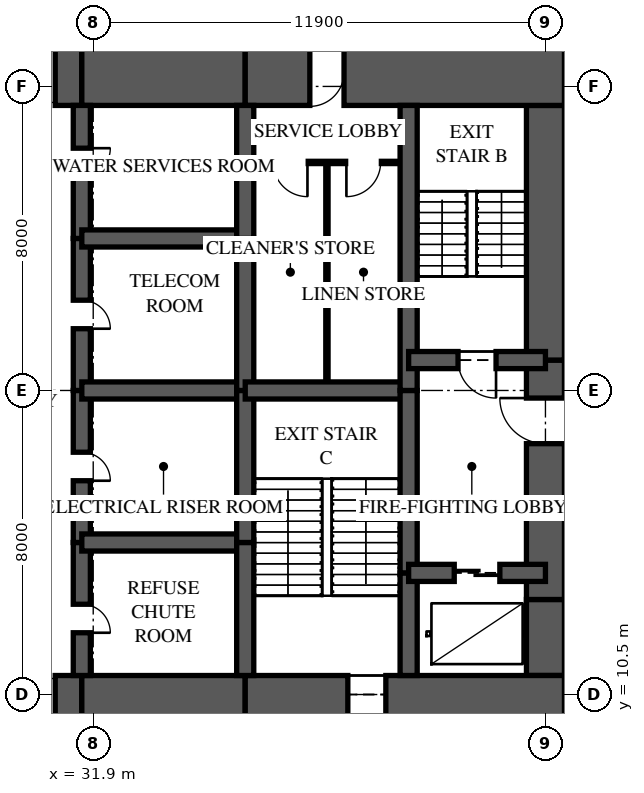
"""IFC4 building model, lengths in metres.
Left out: names, types, materials, properties, quantities, classifications, styles, units other than length and angle.
Written with IfcOpenShell. Run it as: python <this file> out.ifc"""

import sys

from ifc_helpers import new_model, si_unit, direction, frame, frame_2d, origin, place, context, subcontext, project, spatial, rectangle, extrude, element, fill, save


model = new_model("IFC4")
c1 = context("Model", 3, precision=1e-05, world=origin(), true_north=direction((0.0, 1.0)))
c2 = subcontext(c1, "Body", "Model", "MODEL_VIEW")
j1 = project(units=[si_unit("LENGTHUNIT", "METRE"), si_unit("PLANEANGLEUNIT", "RADIAN")], contexts=[c1])
p1 = place(None, origin())
s1 = spatial("IfcSite", under=j1, at=p1, CompositionType="ELEMENT")
p2 = place(p1, origin())
s2 = spatial("IfcBuilding", under=s1, at=p2, CompositionType="ELEMENT")
p3 = place(p2, origin())
s3 = spatial("IfcBuildingStorey", under=s2, at=p3, CompositionType="ELEMENT", Elevation=0.0)
p4 = place(p3, frame((26.0, 10.125, 0.0), z_axis=(0.0, 0.0, 1.0), x_axis=(1.0, 0.0, 0.0)))
e1 = element("IfcWall", 1, at=p4, inside=s3, PredefinedType="SHEAR", context=c2, shape_type="SweptSolid", body=[
    extrude(rectangle(XDim=5.6, YDim=1.75, at=frame_2d((2.8, 0.0))), origin(), (0.0, 0.0, 1.0), 6.0),
])
p5 = place(p4, frame((3.3, 0.0, 0.0)))
e2 = element("IfcOpeningElement", 2, at=p5, cuts=e1, PredefinedType="OPENING", context=c2, shape_type="SweptSolid", body=[
    extrude(rectangle(XDim=1.6, YDim=2.1, at=frame_2d((0.8, 1.05))), frame((0.0, 0.885, 0.0), z_axis=(0.0, -1.0, 0.0), x_axis=(1.0, 0.0, 0.0)), (0.0, 0.0, 1.0), 1.77),
])
p6 = place(p3, frame((31.6, 10.125, 0.0), z_axis=(0.0, 0.0, 1.0), x_axis=(1.0, 0.0, 0.0)))
e3 = element("IfcWall", 3, at=p6, inside=s3, PredefinedType="SHEAR", context=c2, shape_type="SweptSolid", body=[
    extrude(rectangle(XDim=4.3, YDim=1.75, at=frame_2d((2.15, 0.0))), origin(), (0.0, 0.0, 1.0), 6.0),
])
p7 = place(p3, frame((35.9, 10.125, 0.0), z_axis=(0.0, 0.0, 1.0), x_axis=(1.0, 0.0, 0.0)))
e4 = element("IfcWall", 4, at=p7, inside=s3, PredefinedType="SHEAR", context=c2, shape_type="SweptSolid", body=[
    extrude(rectangle(XDim=8.4, YDim=1.75, at=frame_2d((4.2, 0.0))), origin(), (0.0, 0.0, 1.0), 6.0),
])
p8 = place(p7, frame((2.7, 0.0, 0.0)))
e5 = element("IfcOpeningElement", 5, at=p8, cuts=e4, PredefinedType="OPENING", context=c2, shape_type="SweptSolid", body=[
    extrude(rectangle(XDim=1.0, YDim=2.1, at=frame_2d((0.5, 1.05))), frame((0.0, 0.885, 0.0), z_axis=(0.0, -1.0, 0.0), x_axis=(1.0, 0.0, 0.0)), (0.0, 0.0, 1.0), 1.77),
])
p9 = place(p3, frame((44.3, 26.875, 0.0), z_axis=(0.0, 0.0, 1.0), x_axis=(-1.0, 0.0, 0.0)))
e6 = element("IfcWall", 6, at=p9, inside=s3, PredefinedType="SHEAR", context=c2, shape_type="SweptSolid", body=[
    extrude(rectangle(XDim=8.4, YDim=1.75, at=frame_2d((4.2, 0.0))), origin(), (0.0, 0.0, 1.0), 6.0),
])
p10 = place(p9, frame((5.8, 0.0, 0.0)))
e7 = element("IfcOpeningElement", 7, at=p10, cuts=e6, PredefinedType="OPENING", context=c2, shape_type="SweptSolid", body=[
    extrude(rectangle(XDim=0.9, YDim=2.1, at=frame_2d((0.45, 1.05))), frame((0.0, 0.885, 0.0), z_axis=(0.0, -1.0, 0.0), x_axis=(1.0, 0.0, 0.0)), (0.0, 0.0, 1.0), 1.77),
])
p11 = place(p3, frame((35.9, 26.875, 0.0), z_axis=(0.0, 0.0, 1.0), x_axis=(-1.0, 0.0, 0.0)))
e8 = element("IfcWall", 8, at=p11, inside=s3, PredefinedType="SHEAR", context=c2, shape_type="SweptSolid", body=[
    extrude(rectangle(XDim=4.3, YDim=1.75, at=frame_2d((2.15, 0.0))), origin(), (0.0, 0.0, 1.0), 6.0),
])
p12 = place(p3, frame((31.6, 26.875, 0.0), z_axis=(0.0, 0.0, 1.0), x_axis=(-1.0, 0.0, 0.0)))
e9 = element("IfcWall", 9, at=p12, inside=s3, PredefinedType="SHEAR", context=c2, shape_type="SweptSolid", body=[
    extrude(rectangle(XDim=5.6, YDim=1.75, at=frame_2d((2.8, 0.0))), origin(), (0.0, 0.0, 1.0), 6.0),
])
p13 = place(p12, frame((0.7, 0.0, 0.0)))
e10 = element("IfcOpeningElement", 10, at=p13, cuts=e9, PredefinedType="OPENING", context=c2, shape_type="SweptSolid", body=[
    extrude(rectangle(XDim=1.6, YDim=2.1, at=frame_2d((0.8, 1.05))), frame((0.0, 0.885, 0.0), z_axis=(0.0, -1.0, 0.0), x_axis=(1.0, 0.0, 0.0)), (0.0, 0.0, 1.0), 1.77),
])
p14 = place(p3, frame((43.8, 11.0, 0.0), z_axis=(0.0, 0.0, 1.0), x_axis=(0.0, 1.0, 0.0)))
e11 = element("IfcWall", 11, at=p14, inside=s3, PredefinedType="SHEAR", context=c2, shape_type="SweptSolid", body=[
    extrude(rectangle(XDim=2.0, YDim=1.0, at=frame_2d((1.0, 0.0))), origin(), (0.0, 0.0, 1.0), 6.0),
])
p15 = place(p3, frame((43.8, 13.0, 0.0), z_axis=(0.0, 0.0, 1.0), x_axis=(0.0, 1.0, 0.0)))
e12 = element("IfcWall", 12, at=p15, inside=s3, PredefinedType="SHEAR", context=c2, shape_type="SweptSolid", body=[
    extrude(rectangle(XDim=6.3, YDim=1.0, at=frame_2d((3.15, 0.0))), origin(), (0.0, 0.0, 1.0), 6.0),
])
p16 = place(p15, frame((4.1, 0.0, 0.0)))
e13 = element("IfcOpeningElement", 13, at=p16, cuts=e12, PredefinedType="OPENING", context=c2, shape_type="SweptSolid", body=[
    extrude(rectangle(XDim=1.2, YDim=2.2, at=frame_2d((0.6, 1.1))), frame((0.0, 0.51, 0.0), z_axis=(0.0, -1.0, 0.0), x_axis=(1.0, 0.0, 0.0)), (0.0, 0.0, 1.0), 1.02),
])
p17 = place(p3, frame((43.8, 19.3, 0.0), z_axis=(0.0, 0.0, 1.0), x_axis=(0.0, 1.0, 0.0)))
e14 = element("IfcWall", 14, at=p17, inside=s3, PredefinedType="SHEAR", context=c2, shape_type="SweptSolid", body=[
    extrude(rectangle(XDim=6.7, YDim=1.0, at=frame_2d((3.35, 0.0))), origin(), (0.0, 0.0, 1.0), 6.0),
])
p18 = place(p3, frame((31.6, 11.0, 0.0), z_axis=(0.0, 0.0, 1.0), x_axis=(0.0, 1.0, 0.0)))
e15 = element("IfcWall", 15, at=p18, inside=s3, PredefinedType="SHEAR", context=c2, shape_type="SweptSolid", body=[
    extrude(rectangle(XDim=3.5, YDim=0.45, at=frame_2d((1.75, 0.0))), origin(), (0.0, 0.0, 1.0), 6.0),
])
p19 = place(p18, frame((1.125, 0.0, 0.0)))
e16 = element("IfcOpeningElement", 16, at=p19, cuts=e15, PredefinedType="OPENING", context=c2, shape_type="SweptSolid", body=[
    extrude(rectangle(XDim=0.75, YDim=2.1, at=frame_2d((0.375, 1.05))), frame((0.0, 0.235, 0.0), z_axis=(0.0, -1.0, 0.0), x_axis=(1.0, 0.0, 0.0)), (0.0, 0.0, 1.0), 0.47),
])
p20 = place(p3, frame((31.6, 14.5, 0.0), z_axis=(0.0, 0.0, 1.0), x_axis=(0.0, 1.0, 0.0)))
e17 = element("IfcWall", 17, at=p20, inside=s3, PredefinedType="SHEAR", context=c2, shape_type="SweptSolid", body=[
    extrude(rectangle(XDim=4.0, YDim=0.45, at=frame_2d((2.0, 0.0))), origin(), (0.0, 0.0, 1.0), 6.0),
])
p21 = place(p20, frame((1.625, 0.0, 0.0)))
e18 = element("IfcOpeningElement", 18, at=p21, cuts=e17, PredefinedType="OPENING", context=c2, shape_type="SweptSolid", body=[
    extrude(rectangle(XDim=0.75, YDim=2.1, at=frame_2d((0.375, 1.05))), frame((0.0, 0.235, 0.0), z_axis=(0.0, -1.0, 0.0), x_axis=(1.0, 0.0, 0.0)), (0.0, 0.0, 1.0), 0.47),
])
p22 = place(p3, frame((31.6, 18.5, 0.0), z_axis=(0.0, 0.0, 1.0), x_axis=(0.0, 1.0, 0.0)))
e19 = element("IfcWall", 19, at=p22, inside=s3, PredefinedType="SHEAR", context=c2, shape_type="SweptSolid", body=[
    extrude(rectangle(XDim=4.0, YDim=0.45, at=frame_2d((2.0, 0.0))), origin(), (0.0, 0.0, 1.0), 6.0),
])
p23 = place(p22, frame((1.625, 0.0, 0.0)))
e20 = element("IfcOpeningElement", 20, at=p23, cuts=e19, PredefinedType="OPENING", context=c2, shape_type="SweptSolid", body=[
    extrude(rectangle(XDim=0.75, YDim=2.1, at=frame_2d((0.375, 1.05))), frame((0.0, 0.235, 0.0), z_axis=(0.0, -1.0, 0.0), x_axis=(1.0, 0.0, 0.0)), (0.0, 0.0, 1.0), 0.47),
])
p24 = place(p3, frame((31.6, 22.5, 0.0), z_axis=(0.0, 0.0, 1.0), x_axis=(0.0, 1.0, 0.0)))
e21 = element("IfcWall", 21, at=p24, inside=s3, PredefinedType="SHEAR", context=c2, shape_type="SweptSolid", body=[
    extrude(rectangle(XDim=3.5, YDim=0.45, at=frame_2d((1.75, 0.0))), origin(), (0.0, 0.0, 1.0), 6.0),
])
p25 = place(p24, frame((1.625, 0.0, 0.0)))
e22 = element("IfcOpeningElement", 22, at=p25, cuts=e21, PredefinedType="OPENING", context=c2, shape_type="SweptSolid", body=[
    extrude(rectangle(XDim=0.75, YDim=2.1, at=frame_2d((0.375, 1.05))), frame((0.0, 0.235, 0.0), z_axis=(0.0, -1.0, 0.0), x_axis=(1.0, 0.0, 0.0)), (0.0, 0.0, 1.0), 0.47),
])
p26 = place(p3, frame((35.9, 11.0, 0.0), z_axis=(0.0, 0.0, 1.0), x_axis=(0.0, 1.0, 0.0)))
e23 = element("IfcWall", 23, at=p26, inside=s3, PredefinedType="SHEAR", context=c2, shape_type="SweptSolid", body=[
    extrude(rectangle(XDim=3.5, YDim=0.45, at=frame_2d((1.75, 0.0))), origin(), (0.0, 0.0, 1.0), 6.0),
])
for number, where, z_axis, x_axis in (
    (24, (35.9, 14.5, 0.0), (0.0, 0.0, 1.0), (0.0, 1.0, 0.0)),
    (25, (35.9, 18.5, 0.0), (0.0, 0.0, 1.0), (0.0, 1.0, 0.0)),
):
    element("IfcWall", number, at=place(p3, frame(where, z_axis=z_axis, x_axis=x_axis)), inside=s3, PredefinedType="SHEAR", context=c2, shape_type="SweptSolid", body=[
        extrude(rectangle(XDim=4.0, YDim=0.45, at=frame_2d((2.0, 0.0))), origin(), (0.0, 0.0, 1.0), 6.0),
    ])
p27 = place(p3, frame((35.9, 22.5, 0.0), z_axis=(0.0, 0.0, 1.0), x_axis=(0.0, 1.0, 0.0)))
e26 = element("IfcWall", 26, at=p27, inside=s3, PredefinedType="SHEAR", context=c2, shape_type="SweptSolid", body=[
    extrude(rectangle(XDim=3.5, YDim=0.45, at=frame_2d((1.75, 0.0))), origin(), (0.0, 0.0, 1.0), 6.0),
])
p28 = place(p3, frame((40.2, 11.0, 0.0), z_axis=(0.0, 0.0, 1.0), x_axis=(0.0, 1.0, 0.0)))
e27 = element("IfcWall", 27, at=p28, inside=s3, PredefinedType="SHEAR", context=c2, shape_type="SweptSolid", body=[
    extrude(rectangle(XDim=2.7, YDim=0.45, at=frame_2d((1.35, 0.0))), origin(), (0.0, 0.0, 1.0), 6.0),
])
p29 = place(p3, frame((40.2, 13.7, 0.0), z_axis=(0.0, 0.0, 1.0), x_axis=(0.0, 1.0, 0.0)))
e28 = element("IfcWall", 28, at=p29, inside=s3, PredefinedType="SHEAR", context=c2, shape_type="SweptSolid", body=[
    extrude(rectangle(XDim=4.8, YDim=0.45, at=frame_2d((2.4, 0.0))), origin(), (0.0, 0.0, 1.0), 6.0),
])
p30 = place(p3, frame((40.2, 18.5, 0.0), z_axis=(0.0, 0.0, 1.0), x_axis=(0.0, 1.0, 0.0)))
e29 = element("IfcWall", 29, at=p30, inside=s3, PredefinedType="SHEAR", context=c2, shape_type="SweptSolid", body=[
    extrude(rectangle(XDim=7.5, YDim=0.45, at=frame_2d((3.75, 0.0))), origin(), (0.0, 0.0, 1.0), 6.0),
])
for number, where, z_axis, x_axis in (
    (30, (31.6, 14.5, 0.0), (0.0, 0.0, 1.0), (1.0, 0.0, 0.0)),
    (31, (31.6, 18.5, 0.0), (0.0, 0.0, 1.0), (1.0, 0.0, 0.0)),
    (32, (31.6, 22.5, 0.0), (0.0, 0.0, 1.0), (1.0, 0.0, 0.0)),
):
    element("IfcWall", number, at=place(p3, frame(where, z_axis=z_axis, x_axis=x_axis)), inside=s3, PredefinedType="SHEAR", context=c2, shape_type="SweptSolid", body=[
        extrude(rectangle(XDim=4.3, YDim=0.45, at=frame_2d((2.15, 0.0))), origin(), (0.0, 0.0, 1.0), 6.0),
    ])
p31 = place(p3, frame((35.9, 18.5, 0.0), z_axis=(0.0, 0.0, 1.0), x_axis=(1.0, 0.0, 0.0)))
e33 = element("IfcWall", 33, at=p31, inside=s3, PredefinedType="SHEAR", context=c2, shape_type="SweptSolid", body=[
    extrude(rectangle(XDim=4.3, YDim=0.45, at=frame_2d((2.15, 0.0))), origin(), (0.0, 0.0, 1.0), 6.0),
])
p32 = place(p3, frame((40.2, 13.7, 0.0), z_axis=(0.0, 0.0, 1.0), x_axis=(1.0, 0.0, 0.0)))
e34 = element("IfcWall", 34, at=p32, inside=s3, PredefinedType="SHEAR", context=c2, shape_type="SweptSolid", body=[
    extrude(rectangle(XDim=3.6, YDim=0.45, at=frame_2d((1.8, 0.0))), origin(), (0.0, 0.0, 1.0), 6.0),
])
p33 = place(p32, frame((1.2, 0.0, 0.0)))
e35 = element("IfcOpeningElement", 35, at=p33, cuts=e34, PredefinedType="OPENING", context=c2, shape_type="SweptSolid", body=[
    extrude(rectangle(XDim=1.2, YDim=2.1, at=frame_2d((0.6, 1.05))), frame((0.0, 0.235, 0.0), z_axis=(0.0, -1.0, 0.0), x_axis=(1.0, 0.0, 0.0)), (0.0, 0.0, 1.0), 0.47),
])
p34 = place(p3, frame((40.2, 19.3, 0.0), z_axis=(0.0, 0.0, 1.0), x_axis=(1.0, 0.0, 0.0)))
e36 = element("IfcWall", 36, at=p34, inside=s3, PredefinedType="SHEAR", context=c2, shape_type="SweptSolid", body=[
    extrude(rectangle(XDim=3.6, YDim=0.45, at=frame_2d((1.8, 0.0))), origin(), (0.0, 0.0, 1.0), 6.0),
])
p35 = place(p34, frame((1.3, 0.0, 0.0)))
e37 = element("IfcOpeningElement", 37, at=p35, cuts=e36, PredefinedType="OPENING", context=c2, shape_type="SweptSolid", body=[
    extrude(rectangle(XDim=1.0, YDim=2.1, at=frame_2d((0.5, 1.05))), frame((0.0, 0.235, 0.0), z_axis=(0.0, -1.0, 0.0), x_axis=(1.0, 0.0, 0.0)), (0.0, 0.0, 1.0), 0.47),
])
p36 = place(p3, frame((36.125, 24.5, 0.0), z_axis=(0.0, 0.0, 1.0), x_axis=(1.0, 0.0, 0.0)))
e38 = element("IfcWall", 38, at=p36, inside=s3, PredefinedType="PARTITIONING", context=c2, shape_type="SweptSolid", body=[
    extrude(rectangle(XDim=3.85, YDim=0.1, at=frame_2d((1.925, 0.0))), origin(), (0.0, 0.0, 1.0), 5.72),
])
p37 = place(p36, frame((0.512, 0.0, 0.0)))
e39 = element("IfcOpeningElement", 39, at=p37, cuts=e38, PredefinedType="OPENING", context=c2, shape_type="SweptSolid", body=[
    extrude(rectangle(XDim=0.9, YDim=2.1, at=frame_2d((0.45, 1.05))), frame((0.0, 0.06, 0.0), z_axis=(0.0, -1.0, 0.0), x_axis=(1.0, 0.0, 0.0)), (0.0, 0.0, 1.0), 0.12),
])
p38 = place(p36, frame((2.438, 0.0, 0.0)))
e40 = element("IfcOpeningElement", 40, at=p38, cuts=e38, PredefinedType="OPENING", context=c2, shape_type="SweptSolid", body=[
    extrude(rectangle(XDim=0.9, YDim=2.1, at=frame_2d((0.45, 1.05))), frame((0.0, 0.06, 0.0), z_axis=(0.0, -1.0, 0.0), x_axis=(1.0, 0.0, 0.0)), (0.0, 0.0, 1.0), 0.12),
])
p39 = place(p3, frame((38.05, 18.725, 0.0), z_axis=(0.0, 0.0, 1.0), x_axis=(0.0, 1.0, 0.0)))
e41 = element("IfcWall", 41, at=p39, inside=s3, PredefinedType="PARTITIONING", context=c2, shape_type="SweptSolid", body=[
    extrude(rectangle(XDim=5.725, YDim=0.1, at=frame_2d((2.862, 0.0))), origin(), (0.0, 0.0, 1.0), 5.72),
])
p40 = place(p37, frame((0.9, 0.0, 0.0), z_axis=(0.0, 0.0, 1.0), x_axis=(-1.0, 0.0, 0.0)))
e42 = element("IfcDoor", 42, at=p40, inside=s3, OperationType="SINGLE_SWING_LEFT", PredefinedType="DOOR", context=c2, shape_type="SweptSolid", body=[
    extrude(rectangle(XDim=0.9, YDim=2.1, at=frame_2d((0.45, 1.05))), frame((0.0, 0.025, 0.0), z_axis=(0.0, -1.0, 0.0), x_axis=(1.0, 0.0, 0.0)), (0.0, 0.0, 1.0), 0.05),
])
fill(e39, e42)
p41 = place(p38, frame((0.9, 0.0, 0.0), z_axis=(0.0, 0.0, 1.0), x_axis=(-1.0, 0.0, 0.0)))
e43 = element("IfcDoor", 43, at=p41, inside=s3, OperationType="SINGLE_SWING_RIGHT", PredefinedType="DOOR", context=c2, shape_type="SweptSolid", body=[
    extrude(rectangle(XDim=0.9, YDim=2.1, at=frame_2d((0.45, 1.05))), frame((0.0, 0.025, 0.0), z_axis=(0.0, -1.0, 0.0), x_axis=(1.0, 0.0, 0.0)), (0.0, 0.0, 1.0), 0.05),
])
fill(e40, e43)
p42 = place(p35, frame((1.0, 0.0, 0.0), z_axis=(0.0, 0.0, 1.0), x_axis=(-1.0, 0.0, 0.0)))
e44 = element("IfcDoor", 44, at=p42, inside=s3, OperationType="SINGLE_SWING_LEFT", PredefinedType="DOOR", context=c2, shape_type="SweptSolid", body=[
    extrude(rectangle(XDim=1.0, YDim=2.1, at=frame_2d((0.5, 1.05))), frame((0.0, 0.025, 0.0), z_axis=(0.0, -1.0, 0.0), x_axis=(1.0, 0.0, 0.0)), (0.0, 0.0, 1.0), 0.05),
])
fill(e37, e44)
p43 = place(p16, origin())
e45 = element("IfcDoor", 45, at=p43, inside=s3, OperationType="SINGLE_SWING_RIGHT", PredefinedType="DOOR", context=c2, shape_type="SweptSolid", body=[
    extrude(rectangle(XDim=1.2, YDim=2.2, at=frame_2d((0.6, 1.1))), frame((0.0, 0.025, 0.0), z_axis=(0.0, -1.0, 0.0), x_axis=(1.0, 0.0, 0.0)), (0.0, 0.0, 1.0), 0.05),
])
fill(e13, e45)
p44 = place(p33, origin())
e46 = element("IfcDoor", 46, at=p44, inside=s3, OperationType="SLIDING_TO_LEFT", PredefinedType="DOOR", context=c2, shape_type="SweptSolid", body=[
    extrude(rectangle(XDim=1.2, YDim=2.1, at=frame_2d((0.6, 1.05))), frame((0.0, 0.025, 0.0), z_axis=(0.0, -1.0, 0.0), x_axis=(1.0, 0.0, 0.0)), (0.0, 0.0, 1.0), 0.05),
])
fill(e35, e46)
p45 = place(p5, origin())
e47 = element("IfcDoor", 47, at=p45, inside=s3, OperationType="DOUBLE_DOOR_SINGLE_SWING", PredefinedType="DOOR", context=c2, shape_type="SweptSolid", body=[
    extrude(rectangle(XDim=1.6, YDim=2.1, at=frame_2d((0.8, 1.05))), frame((0.0, 0.025, 0.0), z_axis=(0.0, -1.0, 0.0), x_axis=(1.0, 0.0, 0.0)), (0.0, 0.0, 1.0), 0.05),
])
fill(e2, e47)
p46 = place(p13, origin())
e48 = element("IfcDoor", 48, at=p46, inside=s3, OperationType="DOUBLE_DOOR_SINGLE_SWING", PredefinedType="DOOR", context=c2, shape_type="SweptSolid", body=[
    extrude(rectangle(XDim=1.6, YDim=2.1, at=frame_2d((0.8, 1.05))), frame((0.0, 0.025, 0.0), z_axis=(0.0, -1.0, 0.0), x_axis=(1.0, 0.0, 0.0)), (0.0, 0.0, 1.0), 0.05),
])
fill(e10, e48)
p47 = place(p19, frame((0.75, 0.0, 0.0), z_axis=(0.0, 0.0, 1.0), x_axis=(-1.0, 0.0, 0.0)))
e49 = element("IfcDoor", 49, at=p47, inside=s3, OperationType="SINGLE_SWING_RIGHT", PredefinedType="DOOR", context=c2, shape_type="SweptSolid", body=[
    extrude(rectangle(XDim=0.75, YDim=2.1, at=frame_2d((0.375, 1.05))), frame((0.0, 0.025, 0.0), z_axis=(0.0, -1.0, 0.0), x_axis=(1.0, 0.0, 0.0)), (0.0, 0.0, 1.0), 0.05),
])
fill(e16, e49)
p48 = place(p21, frame((0.75, 0.0, 0.0), z_axis=(0.0, 0.0, 1.0), x_axis=(-1.0, 0.0, 0.0)))
e50 = element("IfcDoor", 50, at=p48, inside=s3, OperationType="SINGLE_SWING_RIGHT", PredefinedType="DOOR", context=c2, shape_type="SweptSolid", body=[
    extrude(rectangle(XDim=0.75, YDim=2.1, at=frame_2d((0.375, 1.05))), frame((0.0, 0.025, 0.0), z_axis=(0.0, -1.0, 0.0), x_axis=(1.0, 0.0, 0.0)), (0.0, 0.0, 1.0), 0.05),
])
fill(e18, e50)
p49 = place(p23, frame((0.75, 0.0, 0.0), z_axis=(0.0, 0.0, 1.0), x_axis=(-1.0, 0.0, 0.0)))
e51 = element("IfcDoor", 51, at=p49, inside=s3, OperationType="SINGLE_SWING_RIGHT", PredefinedType="DOOR", context=c2, shape_type="SweptSolid", body=[
    extrude(rectangle(XDim=0.75, YDim=2.1, at=frame_2d((0.375, 1.05))), frame((0.0, 0.025, 0.0), z_axis=(0.0, -1.0, 0.0), x_axis=(1.0, 0.0, 0.0)), (0.0, 0.0, 1.0), 0.05),
])
fill(e20, e51)
p50 = place(p25, frame((0.75, 0.0, 0.0), z_axis=(0.0, 0.0, 1.0), x_axis=(-1.0, 0.0, 0.0)))
e52 = element("IfcDoor", 52, at=p50, inside=s3, OperationType="SINGLE_SWING_LEFT", PredefinedType="DOOR", context=c2, shape_type="SweptSolid", body=[
    extrude(rectangle(XDim=0.75, YDim=2.1, at=frame_2d((0.375, 1.05))), frame((0.0, 0.025, 0.0), z_axis=(0.0, -1.0, 0.0), x_axis=(1.0, 0.0, 0.0)), (0.0, 0.0, 1.0), 0.05),
])
fill(e22, e52)
p51 = place(p8, frame((1.0, 0.0, 0.0), z_axis=(0.0, 0.0, 1.0), x_axis=(-1.0, 0.0, 0.0)))
e53 = element("IfcDoor", 53, at=p51, inside=s3, OperationType="SINGLE_SWING_RIGHT", PredefinedType="DOOR", context=c2, shape_type="SweptSolid", body=[
    extrude(rectangle(XDim=1.0, YDim=2.1, at=frame_2d((0.5, 1.05))), frame((0.0, 0.025, 0.0), z_axis=(0.0, -1.0, 0.0), x_axis=(1.0, 0.0, 0.0)), (0.0, 0.0, 1.0), 0.05),
])
fill(e5, e53)
p52 = place(p10, origin())
e54 = element("IfcDoor", 54, at=p52, inside=s3, OperationType="SINGLE_SWING_RIGHT", PredefinedType="DOOR", context=c2, shape_type="SweptSolid", body=[
    extrude(rectangle(XDim=0.9, YDim=2.1, at=frame_2d((0.45, 1.05))), frame((0.0, 0.47, 0.0), z_axis=(0.0, -1.0, 0.0), x_axis=(1.0, 0.0, 0.0)), (0.0, 0.0, 1.0), 0.8),
])
fill(e7, e54)
save(model, sys.argv[1])
